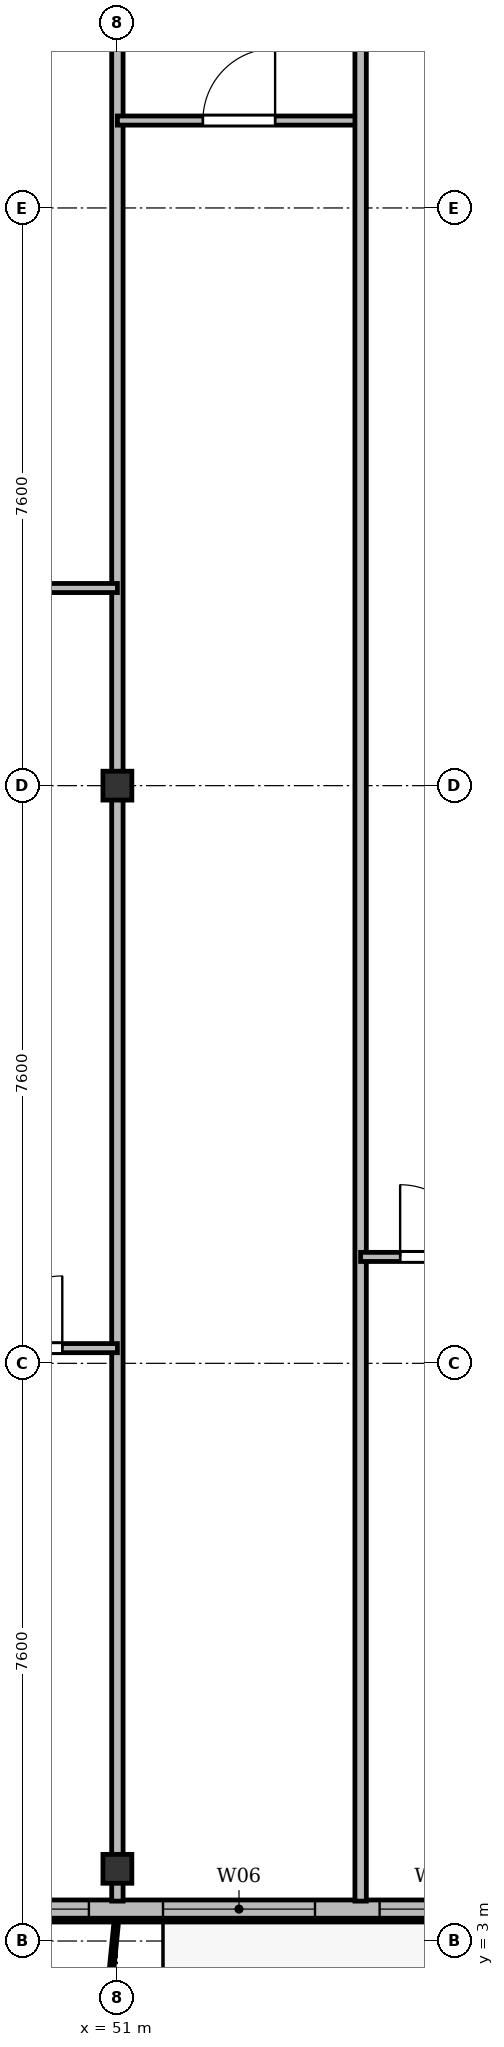
"""IFC4 building model, lengths in metres.
Left out: names, types, materials, properties, quantities, classifications, styles, units other than length and angle.
Written with IfcOpenShell. Run it as: python <this file> out.ifc"""

import sys

from ifc_helpers import new_model, si_unit, direction, frame, frame_2d, origin, origin_2d, place, context, subcontext, project, spatial, rectangle, i_section, extrude, source, transform, mapped, element, fill, save


model = new_model("IFC4")
c1 = context("Model", 3, precision=1e-05, world=origin(), true_north=direction((0.0, 1.0)))
c2 = subcontext(c1, "Body", "Model", "MODEL_VIEW")
j1 = project(units=[si_unit("LENGTHUNIT", "METRE"), si_unit("PLANEANGLEUNIT", "RADIAN")], contexts=[c1])
p1 = place(None, origin())
s1 = spatial("IfcSite", under=j1, at=p1, CompositionType="ELEMENT")
p2 = place(p1, origin())
s2 = spatial("IfcBuilding", under=s1, at=p2, CompositionType="ELEMENT")
p3 = place(p2, frame((0.0, 0.0, 132.1)))
s3 = spatial("IfcBuildingStorey", under=s2, at=p3, CompositionType="ELEMENT", Elevation=132.1)
m1 = source(origin(), c2, "Body", "SweptSolid", [
    extrude(i_section(OverallWidth=0.38, OverallDepth=0.38, WebThickness=0.02, FlangeThickness=0.03, at=origin_2d()), origin(), (0.0, 0.0, 1.0), 3.6),
])
for number, where, z_axis, x_axis in (
    (1, (51.0, 3.95, 0.0), (0.0, 0.0, 1.0), (1.0, 0.0, 0.0)),
    (2, (51.0, 18.2, 0.0), (0.0, 0.0, 1.0), (1.0, 0.0, 0.0)),
):
    element("IfcColumn", number, at=place(p3, frame(where, z_axis=z_axis, x_axis=x_axis)), inside=s3, PredefinedType="COLUMN", context=c2, shape_type="MappedRepresentation", body=[
        mapped(m1, transform((0.0, 0.0, 0.0), x_axis=(1.0, 0.0, 0.0), y_axis=(0.0, 1.0, 0.0), z_axis=(0.0, 0.0, 1.0), scale=1.0)),
    ])
p4 = place(p3, frame((63.6, 3.42, 0.0), z_axis=(0.0, 0.0, 1.0), x_axis=(-1.0, 0.0, 0.0)))
e3 = element("IfcWall", 3, at=p4, inside=s3, PredefinedType="SOLIDWALL", context=c2, shape_type="SweptSolid", body=[
    extrude(rectangle(XDim=52.8, YDim=0.24, at=frame_2d((26.4, 0.0))), origin(), (0.0, 0.0, 1.0), 3.35),
])
p5 = place(p4, frame((0.42, 0.0, 0.9)))
e4 = element("IfcOpeningElement", 4, at=p5, cuts=e3, PredefinedType="OPENING", context=c2, shape_type="SweptSolid", body=[
    extrude(rectangle(XDim=1.65, YDim=1.85, at=frame_2d((0.825, 0.925))), frame((0.0, 0.13, 0.0), z_axis=(0.0, -1.0, 0.0), x_axis=(1.0, 0.0, 0.0)), (0.0, 0.0, 1.0), 0.26),
])
p6 = place(p4, frame((2.75, 0.0, 0.9)))
e5 = element("IfcOpeningElement", 5, at=p6, cuts=e3, PredefinedType="OPENING", context=c2, shape_type="SweptSolid", body=[
    extrude(rectangle(XDim=1.8, YDim=1.8, at=frame_2d((0.9, 0.9))), frame((0.0, 0.13, 0.0), z_axis=(0.0, -1.0, 0.0), x_axis=(1.0, 0.0, 0.0)), (0.0, 0.0, 1.0), 0.26),
])
p7 = place(p4, frame((5.902, 0.0, 0.0)))
e6 = element("IfcOpeningElement", 6, at=p7, cuts=e3, PredefinedType="OPENING", context=c2, shape_type="SweptSolid", body=[
    extrude(rectangle(XDim=1.2, YDim=2.2, at=frame_2d((0.6, 1.1))), frame((0.0, 0.13, 0.0), z_axis=(0.0, -1.0, 0.0), x_axis=(1.0, 0.0, 0.0)), (0.0, 0.0, 1.0), 0.26),
])
p8 = place(p4, frame((7.65, 0.0, 0.9)))
e7 = element("IfcOpeningElement", 7, at=p8, cuts=e3, PredefinedType="OPENING", context=c2, shape_type="SweptSolid", body=[
    extrude(rectangle(XDim=1.5, YDim=1.75, at=frame_2d((0.75, 0.875))), frame((0.0, 0.13, 0.0), z_axis=(0.0, -1.0, 0.0), x_axis=(1.0, 0.0, 0.0)), (0.0, 0.0, 1.0), 0.26),
])
p9 = place(p4, frame((10.0, 0.0, 0.9)))
e8 = element("IfcOpeningElement", 8, at=p9, cuts=e3, PredefinedType="OPENING", context=c2, shape_type="SweptSolid", body=[
    extrude(rectangle(XDim=2.0, YDim=1.95, at=frame_2d((1.0, 0.975))), frame((0.0, 0.13, 0.0), z_axis=(0.0, -1.0, 0.0), x_axis=(1.0, 0.0, 0.0)), (0.0, 0.0, 1.0), 0.26),
])
p10 = place(p4, frame((12.975, 0.0, 0.9)))
e9 = element("IfcOpeningElement", 9, at=p10, cuts=e3, PredefinedType="OPENING", context=c2, shape_type="SweptSolid", body=[
    extrude(rectangle(XDim=1.65, YDim=1.85, at=frame_2d((0.825, 0.925))), frame((0.0, 0.13, 0.0), z_axis=(0.0, -1.0, 0.0), x_axis=(1.0, 0.0, 0.0)), (0.0, 0.0, 1.0), 0.26),
])
p11 = place(p4, frame((15.3, 0.0, 0.9)))
e10 = element("IfcOpeningElement", 10, at=p11, cuts=e3, PredefinedType="OPENING", context=c2, shape_type="SweptSolid", body=[
    extrude(rectangle(XDim=1.8, YDim=1.8, at=frame_2d((0.9, 0.9))), frame((0.0, 0.13, 0.0), z_axis=(0.0, -1.0, 0.0), x_axis=(1.0, 0.0, 0.0)), (0.0, 0.0, 1.0), 0.26),
])
p12 = place(p4, frame((17.85, 0.0, 0.9)))
e11 = element("IfcOpeningElement", 11, at=p12, cuts=e3, PredefinedType="OPENING", context=c2, shape_type="SweptSolid", body=[
    extrude(rectangle(XDim=1.5, YDim=1.75, at=frame_2d((0.75, 0.875))), frame((0.0, 0.13, 0.0), z_axis=(0.0, -1.0, 0.0), x_axis=(1.0, 0.0, 0.0)), (0.0, 0.0, 1.0), 0.26),
])
p13 = place(p4, frame((20.7, 0.0, 0.9)))
e12 = element("IfcOpeningElement", 12, at=p13, cuts=e3, PredefinedType="OPENING", context=c2, shape_type="SweptSolid", body=[
    extrude(rectangle(XDim=1.5, YDim=1.75, at=frame_2d((0.75, 0.875))), frame((0.0, 0.13, 0.0), z_axis=(0.0, -1.0, 0.0), x_axis=(1.0, 0.0, 0.0)), (0.0, 0.0, 1.0), 0.26),
])
p14 = place(p4, frame((23.75, 0.0, 0.9)))
e13 = element("IfcOpeningElement", 13, at=p14, cuts=e3, PredefinedType="OPENING", context=c2, shape_type="SweptSolid", body=[
    extrude(rectangle(XDim=2.0, YDim=1.95, at=frame_2d((1.0, 0.975))), frame((0.0, 0.13, 0.0), z_axis=(0.0, -1.0, 0.0), x_axis=(1.0, 0.0, 0.0)), (0.0, 0.0, 1.0), 0.26),
])
p15 = place(p4, frame((28.875, 0.0, 0.9)))
e14 = element("IfcOpeningElement", 14, at=p15, cuts=e3, PredefinedType="OPENING", context=c2, shape_type="SweptSolid", body=[
    extrude(rectangle(XDim=1.65, YDim=1.85, at=frame_2d((0.825, 0.925))), frame((0.0, 0.13, 0.0), z_axis=(0.0, -1.0, 0.0), x_axis=(1.0, 0.0, 0.0)), (0.0, 0.0, 1.0), 0.26),
])
p16 = place(p4, frame((34.478, 0.0, 0.0)))
e15 = element("IfcOpeningElement", 15, at=p16, cuts=e3, PredefinedType="OPENING", context=c2, shape_type="SweptSolid", body=[
    extrude(rectangle(XDim=1.2, YDim=2.2, at=frame_2d((0.6, 1.1))), frame((0.0, 0.13, 0.0), z_axis=(0.0, -1.0, 0.0), x_axis=(1.0, 0.0, 0.0)), (0.0, 0.0, 1.0), 0.26),
])
p17 = place(p4, frame((37.3, 0.0, 0.9)))
e16 = element("IfcOpeningElement", 16, at=p17, cuts=e3, PredefinedType="OPENING", context=c2, shape_type="SweptSolid", body=[
    extrude(rectangle(XDim=2.2, YDim=1.8, at=frame_2d((1.1, 0.9))), frame((0.0, 0.13, 0.0), z_axis=(0.0, -1.0, 0.0), x_axis=(1.0, 0.0, 0.0)), (0.0, 0.0, 1.0), 0.26),
])
p18 = place(p4, frame((41.05, 0.0, 0.9)))
e17 = element("IfcOpeningElement", 17, at=p18, cuts=e3, PredefinedType="OPENING", context=c2, shape_type="SweptSolid", body=[
    extrude(rectangle(XDim=1.5, YDim=1.75, at=frame_2d((0.75, 0.875))), frame((0.0, 0.13, 0.0), z_axis=(0.0, -1.0, 0.0), x_axis=(1.0, 0.0, 0.0)), (0.0, 0.0, 1.0), 0.26),
])
p19 = place(p4, frame((43.65, 0.0, 0.9)))
e18 = element("IfcOpeningElement", 18, at=p19, cuts=e3, PredefinedType="OPENING", context=c2, shape_type="SweptSolid", body=[
    extrude(rectangle(XDim=1.5, YDim=1.75, at=frame_2d((0.75, 0.875))), frame((0.0, 0.13, 0.0), z_axis=(0.0, -1.0, 0.0), x_axis=(1.0, 0.0, 0.0)), (0.0, 0.0, 1.0), 0.26),
])
p20 = place(p4, frame((45.775, 0.0, 0.9)))
e19 = element("IfcOpeningElement", 19, at=p20, cuts=e3, PredefinedType="OPENING", context=c2, shape_type="SweptSolid", body=[
    extrude(rectangle(XDim=1.65, YDim=1.85, at=frame_2d((0.825, 0.925))), frame((0.0, 0.13, 0.0), z_axis=(0.0, -1.0, 0.0), x_axis=(1.0, 0.0, 0.0)), (0.0, 0.0, 1.0), 0.26),
])
p21 = place(p4, frame((48.1, 0.0, 0.9)))
e20 = element("IfcOpeningElement", 20, at=p21, cuts=e3, PredefinedType="OPENING", context=c2, shape_type="SweptSolid", body=[
    extrude(rectangle(XDim=1.8, YDim=1.8, at=frame_2d((0.9, 0.9))), frame((0.0, 0.13, 0.0), z_axis=(0.0, -1.0, 0.0), x_axis=(1.0, 0.0, 0.0)), (0.0, 0.0, 1.0), 0.26),
])
p22 = place(p4, frame((50.705, 0.0, 0.9)))
e21 = element("IfcOpeningElement", 21, at=p22, cuts=e3, PredefinedType="OPENING", context=c2, shape_type="SweptSolid", body=[
    extrude(rectangle(XDim=1.5, YDim=1.75, at=frame_2d((0.75, 0.875))), frame((0.0, 0.13, 0.0), z_axis=(0.0, -1.0, 0.0), x_axis=(1.0, 0.0, 0.0)), (0.0, 0.0, 1.0), 0.26),
])
p23 = place(p3, frame((51.0, 3.525, 0.0), z_axis=(0.0, 0.0, 1.0), x_axis=(0.0, 1.0, 0.0)))
e22 = element("IfcWall", 22, at=p23, inside=s3, PredefinedType="PARTITIONING", context=c2, shape_type="SweptSolid", body=[
    extrude(rectangle(XDim=27.275, YDim=0.15, at=frame_2d((13.638, 0.0))), origin(), (0.0, 0.0, 1.0), 2.85),
])
p24 = place(p3, frame((43.8, 20.8, 0.0), z_axis=(0.0, 0.0, 1.0), x_axis=(1.0, 0.0, 0.0)))
e23 = element("IfcWall", 23, at=p24, inside=s3, PredefinedType="PARTITIONING", context=c2, shape_type="SweptSolid", body=[
    extrude(rectangle(XDim=7.2, YDim=0.12, at=frame_2d((3.6, 0.0))), origin(), (0.0, 0.0, 1.0), 2.85),
])
p25 = place(p24, frame((3.125, 0.0, 0.0)))
e24 = element("IfcOpeningElement", 24, at=p25, cuts=e23, PredefinedType="OPENING", context=c2, shape_type="SweptSolid", body=[
    extrude(rectangle(XDim=0.95, YDim=2.15, at=frame_2d((0.475, 1.075))), frame((0.0, 0.07, 0.0), z_axis=(0.0, -1.0, 0.0), x_axis=(1.0, 0.0, 0.0)), (0.0, 0.0, 1.0), 0.14),
])
p26 = place(p3, frame((48.6, 10.8, 0.0), z_axis=(0.0, 0.0, 1.0), x_axis=(1.0, 0.0, 0.0)))
e25 = element("IfcWall", 25, at=p26, inside=s3, PredefinedType="PARTITIONING", context=c2, shape_type="SweptSolid", body=[
    extrude(rectangle(XDim=2.4, YDim=0.12, at=frame_2d((1.2, 0.0))), origin(), (0.0, 0.0, 1.0), 2.85),
])
p27 = place(p26, frame((0.725, 0.0, 0.0)))
e26 = element("IfcOpeningElement", 26, at=p27, cuts=e25, PredefinedType="OPENING", context=c2, shape_type="SweptSolid", body=[
    extrude(rectangle(XDim=0.95, YDim=2.15, at=frame_2d((0.475, 1.075))), frame((0.0, 0.07, 0.0), z_axis=(0.0, -1.0, 0.0), x_axis=(1.0, 0.0, 0.0)), (0.0, 0.0, 1.0), 0.14),
])
p28 = place(p3, frame((51.0, 26.95, 0.0), z_axis=(0.0, 0.0, 1.0), x_axis=(1.0, 0.0, 0.0)))
e27 = element("IfcWall", 27, at=p28, inside=s3, PredefinedType="PARTITIONING", context=c2, shape_type="SweptSolid", body=[
    extrude(rectangle(XDim=3.2, YDim=0.12, at=frame_2d((1.6, 0.0))), origin(), (0.0, 0.0, 1.0), 2.85),
])
p29 = place(p28, frame((1.125, 0.0, 0.0)))
e28 = element("IfcOpeningElement", 28, at=p29, cuts=e27, PredefinedType="OPENING", context=c2, shape_type="SweptSolid", body=[
    extrude(rectangle(XDim=0.95, YDim=2.15, at=frame_2d((0.475, 1.075))), frame((0.0, 0.07, 0.0), z_axis=(0.0, -1.0, 0.0), x_axis=(1.0, 0.0, 0.0)), (0.0, 0.0, 1.0), 0.14),
])
p30 = place(p3, frame((54.2, 3.525, 0.0), z_axis=(0.0, 0.0, 1.0), x_axis=(0.0, 1.0, 0.0)))
e29 = element("IfcWall", 29, at=p30, inside=s3, PredefinedType="PARTITIONING", context=c2, shape_type="SweptSolid", body=[
    extrude(rectangle(XDim=27.275, YDim=0.15, at=frame_2d((13.638, 0.0))), origin(), (0.0, 0.0, 1.0), 2.75),
])
p31 = place(p3, frame((54.2, 12.0, 0.0), z_axis=(0.0, 0.0, 1.0), x_axis=(1.0, 0.0, 0.0)))
e30 = element("IfcWall", 30, at=p31, inside=s3, PredefinedType="PARTITIONING", context=c2, shape_type="SweptSolid", body=[
    extrude(rectangle(XDim=2.0, YDim=0.12, at=frame_2d((1.0, 0.0))), origin(), (0.0, 0.0, 1.0), 3.35),
])
p32 = place(p31, frame((0.52, 0.0, 0.0)))
e31 = element("IfcOpeningElement", 31, at=p32, cuts=e30, PredefinedType="OPENING", context=c2, shape_type="SweptSolid", body=[
    extrude(rectangle(XDim=0.95, YDim=2.15, at=frame_2d((0.475, 1.075))), frame((0.0, 0.07, 0.0), z_axis=(0.0, -1.0, 0.0), x_axis=(1.0, 0.0, 0.0)), (0.0, 0.0, 1.0), 0.14),
])
m2 = source(origin(), c2, "Body", "SweptSolid", [
    extrude(rectangle(XDim=1.5, YDim=1.75, at=frame_2d((0.75, 0.875))), frame((0.0, 0.03, 0.0), z_axis=(0.0, -1.0, 0.0), x_axis=(1.0, 0.0, 0.0)), (0.0, 0.0, 1.0), 0.06),
])
p33 = place(p8, origin())
e32 = element("IfcWindow", 32, at=p33, inside=s3, PartitioningType="SINGLE_PANEL", PredefinedType="WINDOW", context=c2, shape_type="MappedRepresentation", body=[
    mapped(m2, transform((0.0, 0.0, 0.0), x_axis=(1.0, 0.0, 0.0), y_axis=(0.0, 1.0, 0.0), z_axis=(0.0, 0.0, 1.0), scale=1.0)),
])
fill(e7, e32)
m3 = source(origin(), c2, "Body", "SweptSolid", [
    extrude(rectangle(XDim=2.0, YDim=1.95, at=frame_2d((1.0, 0.975))), frame((0.0, 0.03, 0.0), z_axis=(0.0, -1.0, 0.0), x_axis=(1.0, 0.0, 0.0)), (0.0, 0.0, 1.0), 0.06),
])
p34 = place(p9, origin())
e33 = element("IfcWindow", 33, at=p34, inside=s3, PartitioningType="SINGLE_PANEL", PredefinedType="WINDOW", context=c2, shape_type="MappedRepresentation", body=[
    mapped(m3, transform((0.0, 0.0, 0.0), x_axis=(1.0, 0.0, 0.0), y_axis=(0.0, 1.0, 0.0), z_axis=(0.0, 0.0, 1.0), scale=1.0)),
])
fill(e8, e33)
m4 = source(origin(), c2, "Body", "SweptSolid", [
    extrude(rectangle(XDim=1.65, YDim=1.85, at=frame_2d((0.825, 0.925))), frame((0.0, 0.03, 0.0), z_axis=(0.0, -1.0, 0.0), x_axis=(1.0, 0.0, 0.0)), (0.0, 0.0, 1.0), 0.06),
])
p35 = place(p10, origin())
e34 = element("IfcWindow", 34, at=p35, inside=s3, PartitioningType="SINGLE_PANEL", PredefinedType="WINDOW", context=c2, shape_type="MappedRepresentation", body=[
    mapped(m4, transform((0.0, 0.0, 0.0), x_axis=(1.0, 0.0, 0.0), y_axis=(0.0, 1.0, 0.0), z_axis=(0.0, 0.0, 1.0), scale=1.0)),
])
fill(e9, e34)
m5 = source(origin(), c2, "Body", "SweptSolid", [
    extrude(rectangle(XDim=0.95, YDim=2.15, at=frame_2d((0.475, 1.075))), frame((0.0, 0.025, 0.0), z_axis=(0.0, -1.0, 0.0), x_axis=(1.0, 0.0, 0.0)), (0.0, 0.0, 1.0), 0.05),
])
p36 = place(p27, origin())
e35 = element("IfcDoor", 35, at=p36, inside=s3, OperationType="SINGLE_SWING_RIGHT", PredefinedType="DOOR", context=c2, shape_type="MappedRepresentation", body=[
    mapped(m5, transform((0.0, 0.0, 0.0), x_axis=(1.0, 0.0, 0.0), y_axis=(0.0, 1.0, 0.0), z_axis=(0.0, 0.0, 1.0), scale=1.0)),
])
fill(e26, e35)
p37 = place(p29, origin())
e36 = element("IfcDoor", 36, at=p37, inside=s3, OperationType="SINGLE_SWING_RIGHT", PredefinedType="DOOR", context=c2, shape_type="MappedRepresentation", body=[
    mapped(m5, transform((0.0, 0.0, 0.0), x_axis=(1.0, 0.0, 0.0), y_axis=(0.0, 1.0, 0.0), z_axis=(0.0, 0.0, 1.0), scale=1.0)),
])
fill(e28, e36)
p38 = place(p32, origin())
e37 = element("IfcDoor", 37, at=p38, inside=s3, OperationType="SINGLE_SWING_LEFT", PredefinedType="DOOR", context=c2, shape_type="MappedRepresentation", body=[
    mapped(m5, transform((0.0, 0.0, 0.0), x_axis=(1.0, 0.0, 0.0), y_axis=(0.0, 1.0, 0.0), z_axis=(0.0, 0.0, 1.0), scale=1.0)),
])
fill(e31, e37)
save(model, sys.argv[1])
